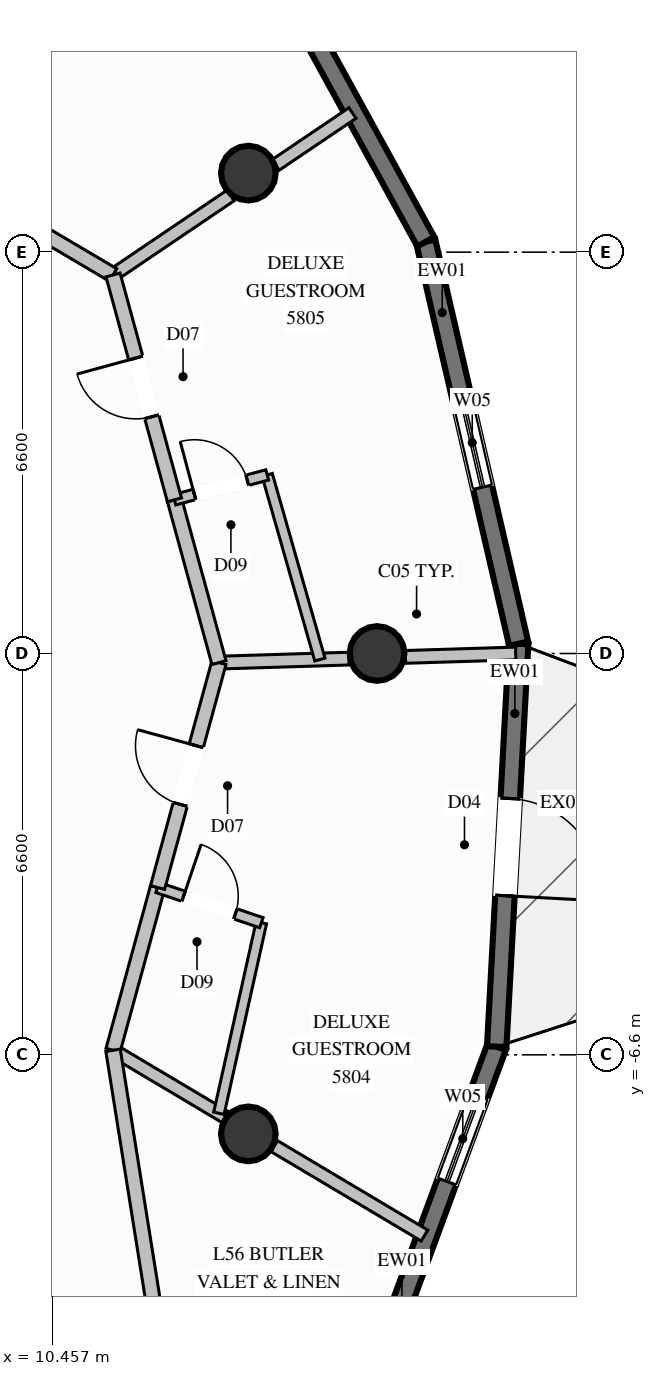
"""IFC4 building model, lengths in metres.
Left out: names, types, materials, properties, quantities, classifications, styles, units other than length and angle.
Written with IfcOpenShell. Run it as: python <this file> out.ifc"""

import sys

from ifc_helpers import new_model, si_unit, direction, frame, frame_2d, origin, origin_2d, place, context, subcontext, project, spatial, rectangle, circle, extrude, element, fill, save


model = new_model("IFC4")
c1 = context("Model", 3, precision=1e-05, world=origin(), true_north=direction((0.0, 1.0)))
c2 = subcontext(c1, "Body", "Model", "MODEL_VIEW")
j1 = project(units=[si_unit("LENGTHUNIT", "METRE"), si_unit("PLANEANGLEUNIT", "RADIAN")], contexts=[c1])
p1 = place(None, origin())
s1 = spatial("IfcSite", under=j1, at=p1, CompositionType="ELEMENT")
p2 = place(p1, origin())
s2 = spatial("IfcBuilding", under=s1, at=p2, CompositionType="ELEMENT")
p3 = place(p2, frame((0.0, 0.0, 216.4)))
s3 = spatial("IfcBuildingStorey", under=s2, at=p3, CompositionType="ELEMENT", Elevation=216.4)
for number, where, z_axis, x_axis in (
    (1, (15.8, 0.0, 0.0), (0.0, 0.0, 1.0), (1.0, 0.0, 0.0)),
    (2, (13.683, 7.9, 0.0), (0.0, 0.0, 1.0), (1.0, 0.0, 0.0)),
    (3, (13.683, -7.9, 0.0), (0.0, 0.0, 1.0), (1.0, 0.0, 0.0)),
):
    element("IfcColumn", number, at=place(p3, frame(where, z_axis=z_axis, x_axis=x_axis)), inside=s3, PredefinedType="COLUMN", context=c2, shape_type="SweptSolid", body=[
        extrude(circle(Radius=0.45, at=origin_2d()), origin(), (0.0, 0.0, 1.0), 3.6),
    ])
p4 = place(p3, frame((17.768, -6.466, 0.0), z_axis=(0.0, 0.0, 1.0), x_axis=(-0.346240086065, -0.938145938968, 0.0)))
e4 = element("IfcWall", 4, at=p4, inside=s3, PredefinedType="SOLIDWALL", context=c2, shape_type="SweptSolid", body=[
    extrude(rectangle(XDim=6.389, YDim=0.32, at=frame_2d((3.195, 0.0))), origin(), (0.0, 0.0, 1.0), 3.36),
])
p5 = place(p4, frame((0.863, 0.0, 0.85)))
e5 = element("IfcOpeningElement", 5, at=p5, cuts=e4, PredefinedType="OPENING", context=c2, shape_type="SweptSolid", body=[
    extrude(rectangle(XDim=1.5, YDim=1.2, at=frame_2d((0.75, 0.6))), frame((0.0, 0.17, 0.0), z_axis=(0.0, -1.0, 0.0), x_axis=(1.0, 0.0, 0.0)), (0.0, 0.0, 1.0), 0.34),
])
p6 = place(p3, frame((18.129, 0.161, 0.0), z_axis=(0.0, 0.0, 1.0), x_axis=(-0.054369799723, -0.998520868524, 0.0)))
e6 = element("IfcWall", 6, at=p6, inside=s3, PredefinedType="SOLIDWALL", context=c2, shape_type="SweptSolid", body=[
    extrude(rectangle(XDim=6.637, YDim=0.32, at=frame_2d((3.318, 0.0))), origin(), (0.0, 0.0, 1.0), 3.36),
])
p7 = place(p6, frame((2.55, 0.0, 0.0)))
e7 = element("IfcOpeningElement", 7, at=p7, cuts=e6, PredefinedType="OPENING", context=c2, shape_type="SweptSolid", body=[
    extrude(rectangle(XDim=1.6, YDim=2.3, at=frame_2d((0.8, 1.15))), frame((0.0, 0.17, 0.0), z_axis=(0.0, -1.0, 0.0), x_axis=(1.0, 0.0, 0.0)), (0.0, 0.0, 1.0), 0.34),
])
p8 = place(p3, frame((16.602, 6.772, 0.0), z_axis=(0.0, 0.0, 1.0), x_axis=(0.225030315826, -0.974351762434, 0.0)))
e8 = element("IfcWall", 8, at=p8, inside=s3, PredefinedType="SOLIDWALL", context=c2, shape_type="SweptSolid", body=[
    extrude(rectangle(XDim=6.785, YDim=0.32, at=frame_2d((3.393, 0.0))), origin(), (0.0, 0.0, 1.0), 3.36),
])
p9 = place(p8, frame((2.643, 0.0, 0.85)))
e9 = element("IfcOpeningElement", 9, at=p9, cuts=e8, PredefinedType="OPENING", context=c2, shape_type="SweptSolid", body=[
    extrude(rectangle(XDim=1.5, YDim=1.2, at=frame_2d((0.75, 0.6))), frame((0.0, 0.17, 0.0), z_axis=(0.0, -1.0, 0.0), x_axis=(1.0, 0.0, 0.0)), (0.0, 0.0, 1.0), 0.34),
])
p10 = place(p3, frame((13.338, 12.72, 0.0), z_axis=(0.0, 0.0, 1.0), x_axis=(0.481099413802, -0.876666044762, 0.0)))
e10 = element("IfcWall", 10, at=p10, inside=s3, PredefinedType="SOLIDWALL", context=c2, shape_type="SweptSolid", body=[
    extrude(rectangle(XDim=6.785, YDim=0.32, at=frame_2d((3.393, 0.0))), origin(), (0.0, 0.0, 1.0), 3.36),
])
p11 = place(p10, frame((1.375, 0.0, 0.85)))
e11 = element("IfcOpeningElement", 11, at=p11, cuts=e10, PredefinedType="OPENING", context=c2, shape_type="SweptSolid", body=[
    extrude(rectangle(XDim=1.5, YDim=1.2, at=frame_2d((0.75, 0.6))), frame((0.0, 0.17, 0.0), z_axis=(0.0, -1.0, 0.0), x_axis=(1.0, 0.0, 0.0)), (0.0, 0.0, 1.0), 0.34),
])
p12 = place(p3, frame((13.2, -0.15, 0.0), z_axis=(0.0, 0.0, 1.0), x_axis=(0.999525017811, 0.030817831998, 0.0)))
e12 = element("IfcWall", 12, at=p12, inside=s3, PredefinedType="PARTITIONING", context=c2, shape_type="SweptSolid", body=[
    extrude(rectangle(XDim=2.139, YDim=0.21, at=frame_2d((1.069, 0.0))), origin(), (0.0, 0.0, 1.0), 3.36),
])
p13 = place(p3, frame((16.267, -0.056, 0.0), z_axis=(0.0, 0.0, 1.0), x_axis=(0.999524860138, 0.030822945458, 0.0)))
e13 = element("IfcWall", 13, at=p13, inside=s3, PredefinedType="PARTITIONING", context=c2, shape_type="SweptSolid", body=[
    extrude(rectangle(XDim=1.814, YDim=0.21, at=frame_2d((0.907, 0.0))), origin(), (0.0, 0.0, 1.0), 3.36),
])
p14 = place(p3, frame((11.458, 6.225, 0.0), z_axis=(0.0, 0.0, 1.0), x_axis=(0.828279126782, 0.560315703989, 0.0)))
e14 = element("IfcWall", 14, at=p14, inside=s3, PredefinedType="PARTITIONING", context=c2, shape_type="SweptSolid", body=[
    extrude(rectangle(XDim=2.333, YDim=0.21, at=frame_2d((1.166, 0.0))), origin(), (0.0, 0.0, 1.0), 2.801),
])
p15 = place(p3, frame((14.133, 8.035, 0.0), z_axis=(0.0, 0.0, 1.0), x_axis=(0.828482449309, 0.560015027643, 0.0)))
e15 = element("IfcWall", 15, at=p15, inside=s3, PredefinedType="PARTITIONING", context=c2, shape_type="SweptSolid", body=[
    extrude(rectangle(XDim=1.523, YDim=0.21, at=frame_2d((0.762, 0.0))), origin(), (0.0, 0.0, 1.0), 3.36),
])
p16 = place(p3, frame((11.458, -6.525, 0.0), z_axis=(0.0, 0.0, 1.0), x_axis=(0.859303593583, -0.511465867928, 0.0)))
e16 = element("IfcWall", 16, at=p16, inside=s3, PredefinedType="PARTITIONING", context=c2, shape_type="SweptSolid", body=[
    extrude(rectangle(XDim=2.147, YDim=0.21, at=frame_2d((1.073, 0.0))), origin(), (0.0, 0.0, 1.0), 2.801),
])
p17 = place(p3, frame((14.108, -8.101, 0.0), z_axis=(0.0, 0.0, 1.0), x_axis=(0.859381683534, -0.511334647767, 0.0)))
e17 = element("IfcWall", 17, at=p17, inside=s3, PredefinedType="PARTITIONING", context=c2, shape_type="SweptSolid", body=[
    extrude(rectangle(XDim=2.877, YDim=0.21, at=frame_2d((1.438, 0.0))), origin(), (0.0, 0.0, 1.0), 3.36),
])
p18 = place(p3, frame((7.35, 8.65, 0.0), z_axis=(0.0, 0.0, 1.0), x_axis=(0.861164858472, -0.508325768118, 0.0)))
e18 = element("IfcWall", 18, at=p18, inside=s3, PredefinedType="PARTITIONING", context=c2, shape_type="SweptSolid", body=[
    extrude(rectangle(XDim=4.77, YDim=0.24, at=frame_2d((2.385, 0.0))), origin(), (0.0, 0.0, 1.0), 3.36),
])
p19 = place(p18, frame((1.885, 0.0, 0.0)))
e19 = element("IfcOpeningElement", 19, at=p19, cuts=e18, PredefinedType="OPENING", context=c2, shape_type="SweptSolid", body=[
    extrude(rectangle(XDim=1.0, YDim=2.2, at=frame_2d((0.5, 1.1))), frame((0.0, 0.13, 0.0), z_axis=(0.0, -1.0, 0.0), x_axis=(1.0, 0.0, 0.0)), (0.0, 0.0, 1.0), 0.26),
])
p20 = place(p3, frame((11.458, -6.525, 0.0), z_axis=(0.0, 0.0, 1.0), x_axis=(0.263735174528, 0.964595126318, 0.0)))
e20 = element("IfcWall", 20, at=p20, inside=s3, PredefinedType="PARTITIONING", context=c2, shape_type="SweptSolid", body=[
    extrude(rectangle(XDim=2.775, YDim=0.24, at=frame_2d((1.388, 0.0))), origin(), (0.0, 0.0, 1.0), 3.36),
])
p21 = place(p3, frame((13.199, -7.561, 0.0), z_axis=(0.0, 0.0, 1.0), x_axis=(0.217389338569, 0.976084973492, 0.0)))
e21 = element("IfcWall", 21, at=p21, inside=s3, PredefinedType="PLUMBINGWALL", context=c2, shape_type="SweptSolid", body=[
    extrude(rectangle(XDim=3.211, YDim=0.175, at=frame_2d((1.605, 0.0))), origin(), (0.0, 0.0, 1.0), 2.929),
])
p22 = place(p3, frame((12.19, -3.848, 0.0), z_axis=(0.0, 0.0, 1.0), x_axis=(0.946990473628, -0.321261642369, 0.0)))
e22 = element("IfcWall", 22, at=p22, inside=s3, PredefinedType="PLUMBINGWALL", context=c2, shape_type="SweptSolid", body=[
    extrude(rectangle(XDim=1.802, YDim=0.175, at=frame_2d((0.901, 0.0))), origin(), (0.0, 0.0, 1.0), 3.36),
])
p23 = place(p22, frame((0.451, 0.0, 0.0)))
e23 = element("IfcOpeningElement", 23, at=p23, cuts=e22, PredefinedType="OPENING", context=c2, shape_type="SweptSolid", body=[
    extrude(rectangle(XDim=0.9, YDim=2.1, at=frame_2d((0.45, 1.05))), frame((0.0, 0.098, 0.0), z_axis=(0.0, -1.0, 0.0), x_axis=(1.0, 0.0, 0.0)), (0.0, 0.0, 1.0), 0.195),
])
p24 = place(p3, frame((12.19, -3.848, 0.0), z_axis=(0.0, 0.0, 1.0), x_axis=(0.263473055226, 0.964666755502, 0.0)))
e24 = element("IfcWall", 24, at=p24, inside=s3, PredefinedType="PARTITIONING", context=c2, shape_type="SweptSolid", body=[
    extrude(rectangle(XDim=3.833, YDim=0.24, at=frame_2d((1.917, 0.0))), origin(), (0.0, 0.0, 1.0), 3.36),
])
p25 = place(p24, frame((1.417, 0.0, 0.0)))
e25 = element("IfcOpeningElement", 25, at=p25, cuts=e24, PredefinedType="OPENING", context=c2, shape_type="SweptSolid", body=[
    extrude(rectangle(XDim=1.0, YDim=2.2, at=frame_2d((0.5, 1.1))), frame((0.0, 0.13, 0.0), z_axis=(0.0, -1.0, 0.0), x_axis=(1.0, 0.0, 0.0)), (0.0, 0.0, 1.0), 0.26),
])
p26 = place(p3, frame((13.2, -0.15, 0.0), z_axis=(0.0, 0.0, 1.0), x_axis=(-0.263735174528, 0.964595126318, 0.0)))
e26 = element("IfcWall", 26, at=p26, inside=s3, PredefinedType="PARTITIONING", context=c2, shape_type="SweptSolid", body=[
    extrude(rectangle(XDim=2.775, YDim=0.24, at=frame_2d((1.388, 0.0))), origin(), (0.0, 0.0, 1.0), 3.36),
])
p27 = place(p3, frame((14.859, -0.099, 0.0), z_axis=(0.0, 0.0, 1.0), x_axis=(-0.274281935333, 0.961649322752, 0.0)))
e27 = element("IfcWall", 27, at=p27, inside=s3, PredefinedType="PLUMBINGWALL", context=c2, shape_type="SweptSolid", body=[
    extrude(rectangle(XDim=3.157, YDim=0.175, at=frame_2d((1.579, 0.0))), origin(), (0.0, 0.0, 1.0), 3.36),
])
p28 = place(p3, frame((12.468, 2.527, 0.0), z_axis=(0.0, 0.0, 1.0), x_axis=(0.965717196803, 0.259596409451, 0.0)))
e28 = element("IfcWall", 28, at=p28, inside=s3, PredefinedType="PLUMBINGWALL", context=c2, shape_type="SweptSolid", body=[
    extrude(rectangle(XDim=1.579, YDim=0.175, at=frame_2d((0.79, 0.0))), origin(), (0.0, 0.0, 1.0), 3.36),
])
p29 = place(p28, frame((0.34, 0.0, 0.0)))
e29 = element("IfcOpeningElement", 29, at=p29, cuts=e28, PredefinedType="OPENING", context=c2, shape_type="SweptSolid", body=[
    extrude(rectangle(XDim=0.9, YDim=2.1, at=frame_2d((0.45, 1.05))), frame((0.0, 0.098, 0.0), z_axis=(0.0, -1.0, 0.0), x_axis=(1.0, 0.0, 0.0)), (0.0, 0.0, 1.0), 0.195),
])
p30 = place(p3, frame((12.468, 2.527, 0.0), z_axis=(0.0, 0.0, 1.0), x_axis=(-0.263473055226, 0.964666755502, 0.0)))
e30 = element("IfcWall", 30, at=p30, inside=s3, PredefinedType="PARTITIONING", context=c2, shape_type="SweptSolid", body=[
    extrude(rectangle(XDim=3.833, YDim=0.24, at=frame_2d((1.917, 0.0))), origin(), (0.0, 0.0, 1.0), 3.36),
])
p31 = place(p30, frame((1.417, 0.0, 0.0)))
e31 = element("IfcOpeningElement", 31, at=p31, cuts=e30, PredefinedType="OPENING", context=c2, shape_type="SweptSolid", body=[
    extrude(rectangle(XDim=1.0, YDim=2.2, at=frame_2d((0.5, 1.1))), frame((0.0, 0.13, 0.0), z_axis=(0.0, -1.0, 0.0), x_axis=(1.0, 0.0, 0.0)), (0.0, 0.0, 1.0), 0.26),
])
p32 = place(p3, frame((12.3, -11.8, 0.0), z_axis=(0.0, 0.0, 1.0), x_axis=(-0.157628647668, 0.987498460472, 0.0)))
e32 = element("IfcWall", 32, at=p32, inside=s3, PredefinedType="PARTITIONING", context=c2, shape_type="SweptSolid", body=[
    extrude(rectangle(XDim=5.342, YDim=0.24, at=frame_2d((2.671, 0.0))), origin(), (0.0, 0.0, 1.0), 3.36),
])
p33 = place(p5, origin())
e33 = element("IfcWindow", 33, at=p33, inside=s3, PartitioningType="SINGLE_PANEL", PredefinedType="WINDOW", context=c2, shape_type="SweptSolid", body=[
    extrude(rectangle(XDim=1.5, YDim=1.2, at=frame_2d((0.75, 0.6))), frame((0.0, 0.03, 0.0), z_axis=(0.0, -1.0, 0.0), x_axis=(1.0, 0.0, 0.0)), (0.0, 0.0, 1.0), 0.06),
])
fill(e5, e33)
p34 = place(p7, origin())
e34 = element("IfcDoor", 34, at=p34, inside=s3, OperationType="SINGLE_SWING_RIGHT", PredefinedType="DOOR", context=c2, shape_type="SweptSolid", body=[
    extrude(rectangle(XDim=1.6, YDim=2.3, at=frame_2d((0.8, 1.15))), frame((0.0, 0.025, 0.0), z_axis=(0.0, -1.0, 0.0), x_axis=(1.0, 0.0, 0.0)), (0.0, 0.0, 1.0), 0.05),
])
fill(e7, e34)
p35 = place(p9, origin())
e35 = element("IfcWindow", 35, at=p35, inside=s3, PartitioningType="SINGLE_PANEL", PredefinedType="WINDOW", context=c2, shape_type="SweptSolid", body=[
    extrude(rectangle(XDim=1.5, YDim=1.2, at=frame_2d((0.75, 0.6))), frame((0.0, 0.03, 0.0), z_axis=(0.0, -1.0, 0.0), x_axis=(1.0, 0.0, 0.0)), (0.0, 0.0, 1.0), 0.06),
])
fill(e9, e35)
p36 = place(p23, origin())
e36 = element("IfcDoor", 36, at=p36, inside=s3, OperationType="SINGLE_SWING_LEFT", PredefinedType="DOOR", context=c2, shape_type="SweptSolid", body=[
    extrude(rectangle(XDim=0.9, YDim=2.1, at=frame_2d((0.45, 1.05))), frame((0.0, 0.025, 0.0), z_axis=(0.0, -1.0, 0.0), x_axis=(1.0, 0.0, 0.0)), (0.0, 0.0, 1.0), 0.05),
])
fill(e23, e36)
p37 = place(p25, origin())
e37 = element("IfcDoor", 37, at=p37, inside=s3, OperationType="SINGLE_SWING_RIGHT", PredefinedType="DOOR", context=c2, shape_type="SweptSolid", body=[
    extrude(rectangle(XDim=1.0, YDim=2.2, at=frame_2d((0.5, 1.1))), frame((0.0, 0.025, 0.0), z_axis=(0.0, -1.0, 0.0), x_axis=(1.0, 0.0, 0.0)), (0.0, 0.0, 1.0), 0.05),
])
fill(e25, e37)
p38 = place(p29, origin())
e38 = element("IfcDoor", 38, at=p38, inside=s3, OperationType="SINGLE_SWING_LEFT", PredefinedType="DOOR", context=c2, shape_type="SweptSolid", body=[
    extrude(rectangle(XDim=0.9, YDim=2.1, at=frame_2d((0.45, 1.05))), frame((0.0, 0.025, 0.0), z_axis=(0.0, -1.0, 0.0), x_axis=(1.0, 0.0, 0.0)), (0.0, 0.0, 1.0), 0.05),
])
fill(e29, e38)
p39 = place(p31, origin())
e39 = element("IfcDoor", 39, at=p39, inside=s3, OperationType="SINGLE_SWING_RIGHT", PredefinedType="DOOR", context=c2, shape_type="SweptSolid", body=[
    extrude(rectangle(XDim=1.0, YDim=2.2, at=frame_2d((0.5, 1.1))), frame((0.0, 0.025, 0.0), z_axis=(0.0, -1.0, 0.0), x_axis=(1.0, 0.0, 0.0)), (0.0, 0.0, 1.0), 0.05),
])
fill(e31, e39)
save(model, sys.argv[1])
